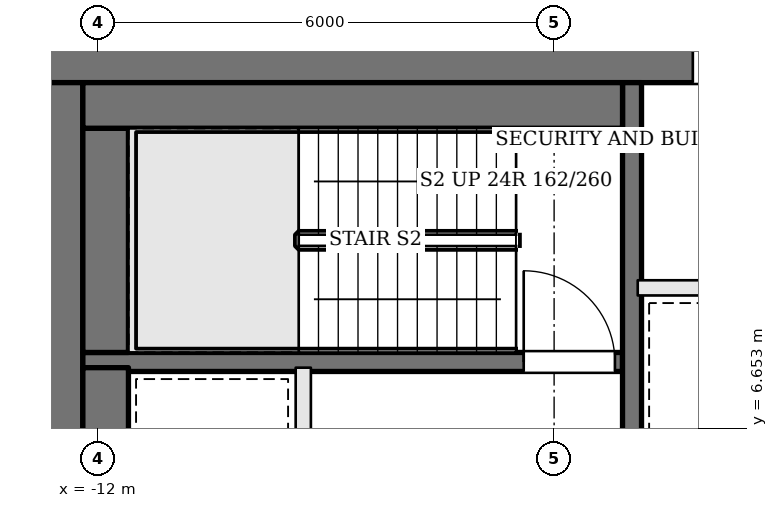
"""IFC4 building model, lengths in metres.
Left out: names, types, materials, properties, quantities, classifications, styles, units other than length and angle.
Written with IfcOpenShell. Run it as: python <this file> out.ifc"""

import sys

from ifc_helpers import new_model, si_unit, direction, frame, frame_2d, origin, place, context, subcontext, project, spatial, rectangle, extrude, element, fill, save


model = new_model("IFC4")
c1 = context("Model", 3, precision=1e-05, world=origin(), true_north=direction((0.0, 1.0)))
c2 = subcontext(c1, "Body", "Model", "MODEL_VIEW")
j1 = project(units=[si_unit("LENGTHUNIT", "METRE"), si_unit("PLANEANGLEUNIT", "RADIAN")], contexts=[c1])
p1 = place(None, origin())
s1 = spatial("IfcSite", under=j1, at=p1, CompositionType="ELEMENT")
p2 = place(p1, origin())
s2 = spatial("IfcBuilding", under=s1, at=p2, CompositionType="ELEMENT")
p3 = place(p2, frame((0.0, 0.0, 233.1)))
s3 = spatial("IfcBuildingStorey", under=s2, at=p3, CompositionType="ELEMENT", Elevation=233.1)
p4 = place(p3, frame((-13.0, 11.6, 0.0), z_axis=(0.0, 0.0, 1.0), x_axis=(1.0, 0.0, 0.0)))
e1 = element("IfcWall", 1, at=p4, inside=s3, PredefinedType="SHEAR", context=c2, shape_type="SweptSolid", body=[
    extrude(rectangle(XDim=26.0, YDim=0.8, at=frame_2d((13.0, 0.0))), origin(), (0.0, 0.0, 1.0), 3.9),
])
p5 = place(p4, frame((8.825, 0.0, 0.0)))
e2 = element("IfcOpeningElement", 2, at=p5, cuts=e1, PredefinedType="OPENING", context=c2, shape_type="SweptSolid", body=[
    extrude(rectangle(XDim=1.0, YDim=2.1, at=frame_2d((0.5, 1.05))), frame((0.0, 0.41, 0.0), z_axis=(0.0, -1.0, 0.0), x_axis=(1.0, 0.0, 0.0)), (0.0, 0.0, 1.0), 0.82),
])
p6 = place(p4, frame((11.825, 0.0, 0.0)))
e3 = element("IfcOpeningElement", 3, at=p6, cuts=e1, PredefinedType="OPENING", context=c2, shape_type="SweptSolid", body=[
    extrude(rectangle(XDim=0.7, YDim=2.1, at=frame_2d((0.35, 1.05))), frame((0.0, 0.41, 0.0), z_axis=(0.0, -1.0, 0.0), x_axis=(1.0, 0.0, 0.0)), (0.0, 0.0, 1.0), 0.82),
])
p7 = place(p4, frame((14.275, 0.0, 0.0)))
e4 = element("IfcOpeningElement", 4, at=p7, cuts=e1, PredefinedType="OPENING", context=c2, shape_type="SweptSolid", body=[
    extrude(rectangle(XDim=0.7, YDim=2.1, at=frame_2d((0.35, 1.05))), frame((0.0, 0.41, 0.0), z_axis=(0.0, -1.0, 0.0), x_axis=(1.0, 0.0, 0.0)), (0.0, 0.0, 1.0), 0.82),
])
p8 = place(p4, frame((16.175, 0.0, 0.0)))
e5 = element("IfcOpeningElement", 5, at=p8, cuts=e1, PredefinedType="OPENING", context=c2, shape_type="SweptSolid", body=[
    extrude(rectangle(XDim=1.0, YDim=2.1, at=frame_2d((0.5, 1.05))), frame((0.0, 0.41, 0.0), z_axis=(0.0, -1.0, 0.0), x_axis=(1.0, 0.0, 0.0)), (0.0, 0.0, 1.0), 0.82),
])
p9 = place(p3, frame((-12.6, -2.2, 0.0), z_axis=(0.0, 0.0, 1.0), x_axis=(0.0, 1.0, 0.0)))
e6 = element("IfcWall", 6, at=p9, inside=s3, PredefinedType="SHEAR", context=c2, shape_type="SweptSolid", body=[
    extrude(rectangle(XDim=13.4, YDim=0.8, at=frame_2d((6.7, 0.0))), origin(), (0.0, 0.0, 1.0), 3.9),
])
p10 = place(p9, frame((4.2, 0.0, 0.0)))
e7 = element("IfcOpeningElement", 7, at=p10, cuts=e6, PredefinedType="OPENING", context=c2, shape_type="SweptSolid", body=[
    extrude(rectangle(XDim=1.8, YDim=2.1, at=frame_2d((0.9, 1.05))), frame((0.0, 0.41, 0.0), z_axis=(0.0, -1.0, 0.0), x_axis=(1.0, 0.0, 0.0)), (0.0, 0.0, 1.0), 0.82),
])
p11 = place(p3, frame((-12.2, 7.525, 0.0), z_axis=(0.0, 0.0, 1.0), x_axis=(1.0, 0.0, 0.0)))
e8 = element("IfcWall", 8, at=p11, inside=s3, PredefinedType="SOLIDWALL", context=c2, shape_type="SweptSolid", body=[
    extrude(rectangle(XDim=7.1, YDim=0.25, at=frame_2d((3.55, 0.0))), origin(), (0.0, 0.0, 1.0), 3.7),
])
p12 = place(p11, frame((5.8, 0.0, 0.0)))
e9 = element("IfcOpeningElement", 9, at=p12, cuts=e8, PredefinedType="OPENING", context=c2, shape_type="SweptSolid", body=[
    extrude(rectangle(XDim=1.2, YDim=2.1, at=frame_2d((0.6, 1.05))), frame((0.0, 0.135, 0.0), z_axis=(0.0, -1.0, 0.0), x_axis=(1.0, 0.0, 0.0)), (0.0, 0.0, 1.0), 0.27),
])
p13 = place(p3, frame((-9.3, 4.45, 0.0), z_axis=(0.0, 0.0, 1.0), x_axis=(0.0, 1.0, 0.0)))
e10 = element("IfcWall", 10, at=p13, inside=s3, PredefinedType="SOLIDWALL", context=c2, shape_type="SweptSolid", body=[
    extrude(rectangle(XDim=3.0, YDim=0.2, at=frame_2d((1.5, 0.0))), origin(), (0.0, 0.0, 1.0), 3.7),
])
p14 = place(p3, frame((-4.975, -2.2, 0.0), z_axis=(0.0, 0.0, 1.0), x_axis=(0.0, 1.0, 0.0)))
e11 = element("IfcWall", 11, at=p14, inside=s3, PredefinedType="SOLIDWALL", context=c2, shape_type="SweptSolid", body=[
    extrude(rectangle(XDim=13.4, YDim=0.25, at=frame_2d((6.7, 0.0))), origin(), (0.0, 0.0, 1.0), 3.7),
])
p15 = place(p14, frame((5.25, 0.0, 0.0)))
e12 = element("IfcOpeningElement", 12, at=p15, cuts=e11, PredefinedType="OPENING", context=c2, shape_type="SweptSolid", body=[
    extrude(rectangle(XDim=1.2, YDim=2.1, at=frame_2d((0.6, 1.05))), frame((0.0, 0.135, 0.0), z_axis=(0.0, -1.0, 0.0), x_axis=(1.0, 0.0, 0.0)), (0.0, 0.0, 1.0), 0.27),
])
p16 = place(p3, frame((-11.9, 4.45, 0.0), z_axis=(0.0, 0.0, 1.0), x_axis=(0.0, 1.0, 0.0)))
e13 = element("IfcWall", 13, at=p16, inside=s3, PredefinedType="SOLIDWALL", context=c2, shape_type="SweptSolid", body=[
    extrude(rectangle(XDim=3.0, YDim=0.6, at=frame_2d((1.5, 0.0))), origin(), (0.0, 0.0, 1.0), 3.7),
])
p17 = place(p3, frame((-11.9, 7.65, 0.0), z_axis=(0.0, 0.0, 1.0), x_axis=(0.0, 1.0, 0.0)))
e14 = element("IfcWall", 14, at=p17, inside=s3, PredefinedType="SOLIDWALL", context=c2, shape_type="SweptSolid", body=[
    extrude(rectangle(XDim=2.95, YDim=0.6, at=frame_2d((1.475, 0.0))), origin(), (0.0, 0.0, 1.0), 3.7),
])
p18 = place(p3, frame((-12.2, 10.9, 0.0), z_axis=(0.0, 0.0, 1.0), x_axis=(1.0, 0.0, 0.0)))
e15 = element("IfcWall", 15, at=p18, inside=s3, PredefinedType="SOLIDWALL", context=c2, shape_type="SweptSolid", body=[
    extrude(rectangle(XDim=7.1, YDim=0.6, at=frame_2d((3.55, 0.0))), origin(), (0.0, 0.0, 1.0), 3.7),
])
p19 = place(p3, frame((-4.9, 8.5, 0.0), z_axis=(0.0, 0.0, 1.0), x_axis=(1.0, 0.0, 0.0)))
e16 = element("IfcWall", 16, at=p19, inside=s3, PredefinedType="SOLIDWALL", context=c2, shape_type="SweptSolid", body=[
    extrude(rectangle(XDim=9.8, YDim=0.2, at=frame_2d((4.9, 0.0))), origin(), (0.0, 0.0, 1.0), 3.7),
])
p20 = place(p12, origin())
e17 = element("IfcDoor", 17, at=p20, inside=s3, OperationType="SINGLE_SWING_LEFT", PredefinedType="DOOR", context=c2, shape_type="SweptSolid", body=[
    extrude(rectangle(XDim=1.2, YDim=2.1, at=frame_2d((0.6, 1.05))), frame((0.0, 0.025, 0.0), z_axis=(0.0, -1.0, 0.0), x_axis=(1.0, 0.0, 0.0)), (0.0, 0.0, 1.0), 0.05),
])
fill(e9, e17)
p21 = place(p5, origin())
e18 = element("IfcDoor", 18, at=p21, inside=s3, OperationType="SINGLE_SWING_LEFT", PredefinedType="DOOR", context=c2, shape_type="SweptSolid", body=[
    extrude(rectangle(XDim=1.0, YDim=2.1, at=frame_2d((0.5, 1.05))), frame((0.0, 0.025, 0.0), z_axis=(0.0, -1.0, 0.0), x_axis=(1.0, 0.0, 0.0)), (0.0, 0.0, 1.0), 0.05),
])
fill(e2, e18)
save(model, sys.argv[1])
